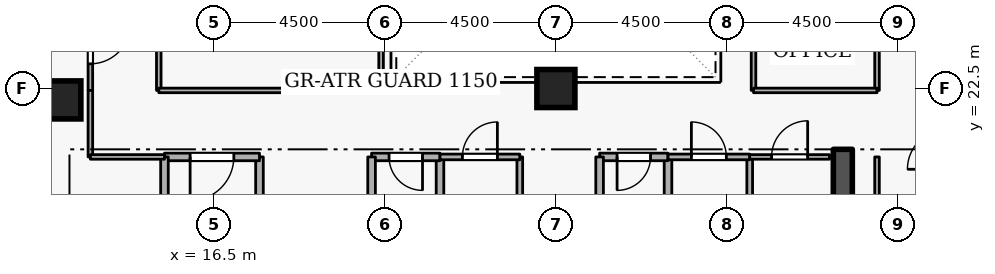
"""IFC4 building model, lengths in metres.
Left out: names, types, materials, properties, quantities, classifications, styles, units other than length and angle.
Written with IfcOpenShell. Run it as: python <this file> out.ifc"""

import sys

from ifc_helpers import new_model, si_unit, direction, frame, frame_2d, origin, origin_2d, place, context, subcontext, project, spatial, rectangle, extrude, element, fill, save


model = new_model("IFC4")
c1 = context("Model", 3, precision=1e-05, world=origin(), true_north=direction((0.0, 1.0)))
c2 = subcontext(c1, "Body", "Model", "MODEL_VIEW")
j1 = project(units=[si_unit("LENGTHUNIT", "METRE"), si_unit("PLANEANGLEUNIT", "RADIAN")], contexts=[c1])
p1 = place(None, origin())
s1 = spatial("IfcSite", under=j1, at=p1, CompositionType="ELEMENT")
p2 = place(p1, origin())
s2 = spatial("IfcBuilding", under=s1, at=p2, CompositionType="ELEMENT")
p3 = place(p2, frame((0.0, 0.0, 200.1)))
s3 = spatial("IfcBuildingStorey", under=s2, at=p3, CompositionType="ELEMENT", Elevation=200.1)
p4 = place(p3, frame((33.05, 15.1, 0.0), z_axis=(0.0, 0.0, 1.0), x_axis=(0.0, 1.0, 0.0)))
e1 = element("IfcWall", 1, at=p4, inside=s3, PredefinedType="SHEAR", context=c2, shape_type="SweptSolid", body=[
    extrude(rectangle(XDim=5.8, YDim=0.5, at=frame_2d((2.9, 0.0))), origin(), (0.0, 0.0, 1.0), 3.6),
])
for number, where, z_axis, x_axis in (
    (2, (12.5, 22.2, 0.0), (0.0, 0.0, 1.0), (1.0, 0.0, 0.0)),
    (3, (25.5, 22.5, 0.0), (0.0, 0.0, 1.0), (1.0, 0.0, 0.0)),
):
    element("IfcColumn", number, at=place(p3, frame(where, z_axis=z_axis, x_axis=x_axis)), inside=s3, PredefinedType="COLUMN", context=c2, shape_type="SweptSolid", body=[
        extrude(rectangle(XDim=1.0, YDim=1.0, at=origin_2d()), origin(), (0.0, 0.0, 1.0), 3.6),
    ])
p5 = place(p3, frame((17.7, 18.4, 0.0), z_axis=(0.0, 0.0, 1.0), x_axis=(0.0, 1.0, 0.0)))
e4 = element("IfcWall", 4, at=p5, inside=s3, PredefinedType="STANDARD", context=c2, shape_type="SweptSolid", body=[
    extrude(rectangle(XDim=2.3, YDim=0.2, at=frame_2d((1.15, 0.0))), origin(), (0.0, 0.0, 1.0), 2.525),
])
p6 = place(p3, frame((17.7, 20.7, 0.0), z_axis=(0.0, 0.0, 1.0), x_axis=(-1.0, 0.0, 0.0)))
e5 = element("IfcWall", 5, at=p6, inside=s3, PredefinedType="STANDARD", context=c2, shape_type="SweptSolid", body=[
    extrude(rectangle(XDim=2.5, YDim=0.2, at=frame_2d((1.25, 0.0))), origin(), (0.0, 0.0, 1.0), 3.32),
])
p7 = place(p6, frame((0.675, 0.0, 0.0)))
e6 = element("IfcOpeningElement", 6, at=p7, cuts=e5, PredefinedType="OPENING", context=c2, shape_type="SweptSolid", body=[
    extrude(rectangle(XDim=1.15, YDim=2.1, at=frame_2d((0.575, 1.05))), frame((0.0, 0.11, 0.0), z_axis=(0.0, -1.0, 0.0), x_axis=(1.0, 0.0, 0.0)), (0.0, 0.0, 1.0), 0.22),
])
p8 = place(p3, frame((15.2, 20.7, 0.0), z_axis=(0.0, 0.0, 1.0), x_axis=(0.0, -1.0, 0.0)))
e7 = element("IfcWall", 7, at=p8, inside=s3, PredefinedType="STANDARD", context=c2, shape_type="SweptSolid", body=[
    extrude(rectangle(XDim=5.7, YDim=0.2, at=frame_2d((2.85, 0.0))), origin(), (0.0, 0.0, 1.0), 3.32),
])
p9 = place(p3, frame((28.45, 18.65, 0.0), z_axis=(0.0, 0.0, 1.0), x_axis=(0.0, 1.0, 0.0)))
e8 = element("IfcWall", 8, at=p9, inside=s3, PredefinedType="STANDARD", context=c2, shape_type="SweptSolid", body=[
    extrude(rectangle(XDim=2.05, YDim=0.2, at=frame_2d((1.025, 0.0))), origin(), (0.0, 0.0, 1.0), 3.32),
])
p10 = place(p3, frame((28.45, 20.7, 0.0), z_axis=(0.0, 0.0, 1.0), x_axis=(-1.0, 0.0, 0.0)))
e9 = element("IfcWall", 9, at=p10, inside=s3, PredefinedType="STANDARD", context=c2, shape_type="SweptSolid", body=[
    extrude(rectangle(XDim=1.8, YDim=0.2, at=frame_2d((0.9, 0.0))), origin(), (0.0, 0.0, 1.0), 3.32),
])
p11 = place(p10, frame((0.46, 0.0, 0.0)))
e10 = element("IfcOpeningElement", 10, at=p11, cuts=e9, PredefinedType="OPENING", context=c2, shape_type="SweptSolid", body=[
    extrude(rectangle(XDim=0.88, YDim=2.04, at=frame_2d((0.44, 1.02))), frame((0.0, 0.11, 0.0), z_axis=(0.0, -1.0, 0.0), x_axis=(1.0, 0.0, 0.0)), (0.0, 0.0, 1.0), 0.22),
])
for number, where, z_axis, x_axis in (
    (11, (26.65, 20.7, 0.0), (0.0, 0.0, 1.0), (0.0, -1.0, 0.0)),
    (12, (22.45, 18.65, 0.0), (0.0, 0.0, 1.0), (0.0, 1.0, 0.0)),
):
    element("IfcWall", number, at=place(p3, frame(where, z_axis=z_axis, x_axis=x_axis)), inside=s3, PredefinedType="STANDARD", context=c2, shape_type="SweptSolid", body=[
        extrude(rectangle(XDim=2.05, YDim=0.2, at=frame_2d((1.025, 0.0))), origin(), (0.0, 0.0, 1.0), 3.32),
    ])
p12 = place(p3, frame((22.45, 20.7, 0.0), z_axis=(0.0, 0.0, 1.0), x_axis=(-1.0, 0.0, 0.0)))
e13 = element("IfcWall", 13, at=p12, inside=s3, PredefinedType="STANDARD", context=c2, shape_type="SweptSolid", body=[
    extrude(rectangle(XDim=1.8, YDim=0.2, at=frame_2d((0.9, 0.0))), origin(), (0.0, 0.0, 1.0), 3.32),
])
p13 = place(p12, frame((0.46, 0.0, 0.0)))
e14 = element("IfcOpeningElement", 14, at=p13, cuts=e13, PredefinedType="OPENING", context=c2, shape_type="SweptSolid", body=[
    extrude(rectangle(XDim=0.88, YDim=2.04, at=frame_2d((0.44, 1.02))), frame((0.0, 0.11, 0.0), z_axis=(0.0, -1.0, 0.0), x_axis=(1.0, 0.0, 0.0)), (0.0, 0.0, 1.0), 0.22),
])
p14 = place(p3, frame((20.65, 20.7, 0.0), z_axis=(0.0, 0.0, 1.0), x_axis=(0.0, -1.0, 0.0)))
e15 = element("IfcWall", 15, at=p14, inside=s3, PredefinedType="STANDARD", context=c2, shape_type="SweptSolid", body=[
    extrude(rectangle(XDim=2.05, YDim=0.2, at=frame_2d((1.025, 0.0))), origin(), (0.0, 0.0, 1.0), 3.32),
])
p15 = place(p3, frame((24.55, 20.7, 0.0), z_axis=(0.0, 0.0, 1.0), x_axis=(0.0, -1.0, 0.0)))
e16 = element("IfcWall", 16, at=p15, inside=s3, PredefinedType="PARTITIONING", context=c2, shape_type="SweptSolid", body=[
    extrude(rectangle(XDim=2.05, YDim=0.15, at=frame_2d((1.025, 0.0))), origin(), (0.0, 0.0, 1.0), 3.32),
])
p16 = place(p3, frame((22.45, 20.7, 0.0), z_axis=(0.0, 0.0, 1.0), x_axis=(1.0, 0.0, 0.0)))
e17 = element("IfcWall", 17, at=p16, inside=s3, PredefinedType="PARTITIONING", context=c2, shape_type="SweptSolid", body=[
    extrude(rectangle(XDim=2.1, YDim=0.15, at=frame_2d((1.05, 0.0))), origin(), (0.0, 0.0, 1.0), 3.32),
])
p17 = place(p16, frame((0.59, 0.0, 0.0)))
e18 = element("IfcOpeningElement", 18, at=p17, cuts=e17, PredefinedType="OPENING", context=c2, shape_type="SweptSolid", body=[
    extrude(rectangle(XDim=0.92, YDim=2.08, at=frame_2d((0.46, 1.04))), frame((0.0, 0.085, 0.0), z_axis=(0.0, -1.0, 0.0), x_axis=(1.0, 0.0, 0.0)), (0.0, 0.0, 1.0), 0.17),
])
p18 = place(p3, frame((30.6, 20.7, 0.0), z_axis=(0.0, 0.0, 1.0), x_axis=(0.0, -1.0, 0.0)))
e19 = element("IfcWall", 19, at=p18, inside=s3, PredefinedType="PARTITIONING", context=c2, shape_type="SweptSolid", body=[
    extrude(rectangle(XDim=2.05, YDim=0.15, at=frame_2d((1.025, 0.0))), origin(), (0.0, 0.0, 1.0), 3.32),
])
p19 = place(p3, frame((28.45, 20.7, 0.0), z_axis=(0.0, 0.0, 1.0), x_axis=(1.0, 0.0, 0.0)))
e20 = element("IfcWall", 20, at=p19, inside=s3, PredefinedType="PARTITIONING", context=c2, shape_type="SweptSolid", body=[
    extrude(rectangle(XDim=2.15, YDim=0.15, at=frame_2d((1.075, 0.0))), origin(), (0.0, 0.0, 1.0), 3.32),
])
p20 = place(p19, frame((0.615, 0.0, 0.0)))
e21 = element("IfcOpeningElement", 21, at=p20, cuts=e20, PredefinedType="OPENING", context=c2, shape_type="SweptSolid", body=[
    extrude(rectangle(XDim=0.92, YDim=2.08, at=frame_2d((0.46, 1.04))), frame((0.0, 0.085, 0.0), z_axis=(0.0, -1.0, 0.0), x_axis=(1.0, 0.0, 0.0)), (0.0, 0.0, 1.0), 0.17),
])
p21 = place(p3, frame((30.6, 20.7, 0.0), z_axis=(0.0, 0.0, 1.0), x_axis=(1.0, 0.0, 0.0)))
e22 = element("IfcWall", 22, at=p21, inside=s3, PredefinedType="PARTITIONING", context=c2, shape_type="SweptSolid", body=[
    extrude(rectangle(XDim=2.1, YDim=0.12, at=frame_2d((1.05, 0.0))), origin(), (0.0, 0.0, 1.0), 3.32),
])
p22 = place(p21, frame((0.575, 0.0, 0.0)))
e23 = element("IfcOpeningElement", 23, at=p22, cuts=e22, PredefinedType="OPENING", context=c2, shape_type="SweptSolid", body=[
    extrude(rectangle(XDim=0.95, YDim=2.1, at=frame_2d((0.475, 1.05))), frame((0.0, 0.07, 0.0), z_axis=(0.0, -1.0, 0.0), x_axis=(1.0, 0.0, 0.0)), (0.0, 0.0, 1.0), 0.14),
])
p23 = place(p3, frame((33.95, 20.7, 0.0), z_axis=(0.0, 0.0, 1.0), x_axis=(0.0, -1.0, 0.0)))
e24 = element("IfcWall", 24, at=p23, inside=s3, PredefinedType="PARTITIONING", context=c2, shape_type="SweptSolid", body=[
    extrude(rectangle(XDim=5.9, YDim=0.12, at=frame_2d((2.95, 0.0))), origin(), (0.0, 0.0, 1.0), 3.32),
])
p24 = place(p3, frame((13.25, 24.9, 0.0), z_axis=(0.0, 0.0, 1.0), x_axis=(0.0, -1.0, 0.0)))
e25 = element("IfcWall", 25, at=p24, inside=s3, PredefinedType="PARTITIONING", context=c2, shape_type="SweptSolid", body=[
    extrude(rectangle(XDim=2.45, YDim=0.12, at=frame_2d((1.225, 0.0))), origin(), (0.0, 0.0, 1.0), 3.32),
])
p25 = place(p24, frame((0.7, 0.0, 0.0)))
e26 = element("IfcOpeningElement", 26, at=p25, cuts=e25, PredefinedType="OPENING", context=c2, shape_type="SweptSolid", body=[
    extrude(rectangle(XDim=1.05, YDim=2.1, at=frame_2d((0.525, 1.05))), frame((0.0, 0.07, 0.0), z_axis=(0.0, -1.0, 0.0), x_axis=(1.0, 0.0, 0.0)), (0.0, 0.0, 1.0), 0.14),
])
p26 = place(p3, frame((13.25, 22.45, 0.0), z_axis=(0.0, 0.0, 1.0), x_axis=(0.0, -1.0, 0.0)))
e27 = element("IfcWall", 27, at=p26, inside=s3, PredefinedType="PARTITIONING", context=c2, shape_type="SweptSolid", body=[
    extrude(rectangle(XDim=1.75, YDim=0.12, at=frame_2d((0.875, 0.0))), origin(), (0.0, 0.0, 1.0), 3.32),
])
p27 = place(p3, frame((13.25, 20.7, 0.0), z_axis=(0.0, 0.0, 1.0), x_axis=(1.0, 0.0, 0.0)))
e28 = element("IfcWall", 28, at=p27, inside=s3, PredefinedType="PARTITIONING", context=c2, shape_type="SweptSolid", body=[
    extrude(rectangle(XDim=1.95, YDim=0.12, at=frame_2d((0.975, 0.0))), origin(), (0.0, 0.0, 1.0), 3.32),
])
p28 = place(p3, frame((15.05, 22.45, 0.0), z_axis=(0.0, 0.0, 1.0), x_axis=(0.0, 1.0, 0.0)))
e29 = element("IfcWall", 29, at=p28, inside=s3, PredefinedType="PARTITIONING", context=c2, shape_type="SweptSolid", body=[
    extrude(rectangle(XDim=9.1, YDim=0.12, at=frame_2d((4.55, 0.0))), origin(), (0.0, 0.0, 1.0), 3.32),
])
p29 = place(p28, frame((4.075, 0.0, 0.0)))
e30 = element("IfcOpeningElement", 30, at=p29, cuts=e29, PredefinedType="OPENING", context=c2, shape_type="SweptSolid", body=[
    extrude(rectangle(XDim=0.95, YDim=2.1, at=frame_2d((0.475, 1.05))), frame((0.0, 0.07, 0.0), z_axis=(0.0, -1.0, 0.0), x_axis=(1.0, 0.0, 0.0)), (0.0, 0.0, 1.0), 0.14),
])
p30 = place(p3, frame((20.9, 31.55, 0.0), z_axis=(0.0, 0.0, 1.0), x_axis=(0.0, -1.0, 0.0)))
e31 = element("IfcWall", 31, at=p30, inside=s3, PredefinedType="PARTITIONING", context=c2, shape_type="SweptSolid", body=[
    extrude(rectangle(XDim=9.1, YDim=0.12, at=frame_2d((4.55, 0.0))), origin(), (0.0, 0.0, 1.0), 3.32),
])
p31 = place(p3, frame((20.9, 22.45, 0.0), z_axis=(0.0, 0.0, 1.0), x_axis=(-1.0, 0.0, 0.0)))
e32 = element("IfcWall", 32, at=p31, inside=s3, PredefinedType="PARTITIONING", context=c2, shape_type="SweptSolid", body=[
    extrude(rectangle(XDim=5.85, YDim=0.12, at=frame_2d((2.925, 0.0))), origin(), (0.0, 0.0, 1.0), 3.32),
])
p32 = place(p3, frame((30.7, 22.45, 0.0), z_axis=(0.0, 0.0, 1.0), x_axis=(0.0, 1.0, 0.0)))
e33 = element("IfcWall", 33, at=p32, inside=s3, PredefinedType="PARTITIONING", context=c2, shape_type="SweptSolid", body=[
    extrude(rectangle(XDim=9.1, YDim=0.12, at=frame_2d((4.55, 0.0))), origin(), (0.0, 0.0, 1.0), 3.32),
])
p33 = place(p3, frame((33.95, 31.55, 0.0), z_axis=(0.0, 0.0, 1.0), x_axis=(0.0, -1.0, 0.0)))
e34 = element("IfcWall", 34, at=p33, inside=s3, PredefinedType="PARTITIONING", context=c2, shape_type="SweptSolid", body=[
    extrude(rectangle(XDim=9.1, YDim=0.12, at=frame_2d((4.55, 0.0))), origin(), (0.0, 0.0, 1.0), 3.32),
])
p34 = place(p33, frame((4.075, 0.0, 0.0)))
e35 = element("IfcOpeningElement", 35, at=p34, cuts=e34, PredefinedType="OPENING", context=c2, shape_type="SweptSolid", body=[
    extrude(rectangle(XDim=0.95, YDim=2.1, at=frame_2d((0.475, 1.05))), frame((0.0, 0.07, 0.0), z_axis=(0.0, -1.0, 0.0), x_axis=(1.0, 0.0, 0.0)), (0.0, 0.0, 1.0), 0.14),
])
p35 = place(p3, frame((33.95, 22.45, 0.0), z_axis=(0.0, 0.0, 1.0), x_axis=(-1.0, 0.0, 0.0)))
e36 = element("IfcWall", 36, at=p35, inside=s3, PredefinedType="PARTITIONING", context=c2, shape_type="SweptSolid", body=[
    extrude(rectangle(XDim=3.25, YDim=0.12, at=frame_2d((1.625, 0.0))), origin(), (0.0, 0.0, 1.0), 3.32),
])
p36 = place(p7, origin())
e37 = element("IfcDoor", 37, at=p36, inside=s3, OperationType="SINGLE_SWING_RIGHT", PredefinedType="DOOR", context=c2, shape_type="SweptSolid", body=[
    extrude(rectangle(XDim=1.15, YDim=2.1, at=frame_2d((0.575, 1.05))), frame((0.0, 0.025, 0.0), z_axis=(0.0, -1.0, 0.0), x_axis=(1.0, 0.0, 0.0)), (0.0, 0.0, 1.0), 0.05),
])
fill(e6, e37)
p37 = place(p11, origin())
e38 = element("IfcDoor", 38, at=p37, inside=s3, OperationType="SINGLE_SWING_RIGHT", PredefinedType="DOOR", context=c2, shape_type="SweptSolid", body=[
    extrude(rectangle(XDim=0.88, YDim=2.04, at=frame_2d((0.44, 1.02))), frame((0.0, 0.025, 0.0), z_axis=(0.0, -1.0, 0.0), x_axis=(1.0, 0.0, 0.0)), (0.0, 0.0, 1.0), 0.05),
])
fill(e10, e38)
p38 = place(p13, origin())
e39 = element("IfcDoor", 39, at=p38, inside=s3, OperationType="SINGLE_SWING_LEFT", PredefinedType="DOOR", context=c2, shape_type="SweptSolid", body=[
    extrude(rectangle(XDim=0.88, YDim=2.04, at=frame_2d((0.44, 1.02))), frame((0.0, 0.025, 0.0), z_axis=(0.0, -1.0, 0.0), x_axis=(1.0, 0.0, 0.0)), (0.0, 0.0, 1.0), 0.05),
])
fill(e14, e39)
p39 = place(p17, origin())
e40 = element("IfcDoor", 40, at=p39, inside=s3, OperationType="SINGLE_SWING_RIGHT", PredefinedType="DOOR", context=c2, shape_type="SweptSolid", body=[
    extrude(rectangle(XDim=0.92, YDim=2.08, at=frame_2d((0.46, 1.04))), frame((0.0, 0.025, 0.0), z_axis=(0.0, -1.0, 0.0), x_axis=(1.0, 0.0, 0.0)), (0.0, 0.0, 1.0), 0.05),
])
fill(e18, e40)
p40 = place(p20, origin())
e41 = element("IfcDoor", 41, at=p40, inside=s3, OperationType="SINGLE_SWING_LEFT", PredefinedType="DOOR", context=c2, shape_type="SweptSolid", body=[
    extrude(rectangle(XDim=0.92, YDim=2.08, at=frame_2d((0.46, 1.04))), frame((0.0, 0.025, 0.0), z_axis=(0.0, -1.0, 0.0), x_axis=(1.0, 0.0, 0.0)), (0.0, 0.0, 1.0), 0.05),
])
fill(e21, e41)
p41 = place(p22, origin())
e42 = element("IfcDoor", 42, at=p41, inside=s3, OperationType="SINGLE_SWING_RIGHT", PredefinedType="DOOR", context=c2, shape_type="SweptSolid", body=[
    extrude(rectangle(XDim=0.95, YDim=2.1, at=frame_2d((0.475, 1.05))), frame((0.0, 0.025, 0.0), z_axis=(0.0, -1.0, 0.0), x_axis=(1.0, 0.0, 0.0)), (0.0, 0.0, 1.0), 0.05),
])
fill(e23, e42)
p42 = place(p25, origin())
e43 = element("IfcDoor", 43, at=p42, inside=s3, OperationType="SINGLE_SWING_LEFT", PredefinedType="DOOR", context=c2, shape_type="SweptSolid", body=[
    extrude(rectangle(XDim=1.05, YDim=2.1, at=frame_2d((0.525, 1.05))), frame((0.0, 0.025, 0.0), z_axis=(0.0, -1.0, 0.0), x_axis=(1.0, 0.0, 0.0)), (0.0, 0.0, 1.0), 0.05),
])
fill(e26, e43)
save(model, sys.argv[1])
